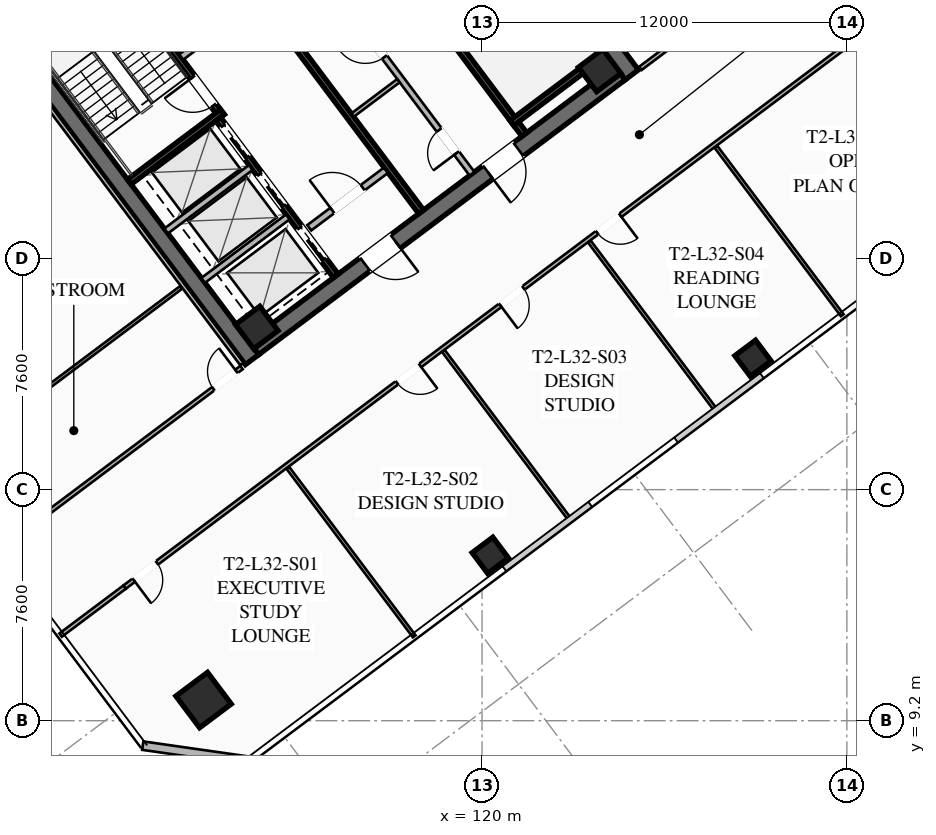
"""IFC4 building model, lengths in metres.
Left out: names, types, materials, properties, quantities, classifications, styles, units other than length and angle.
Written with IfcOpenShell. Run it as: python <this file> out.ifc"""

import sys

from ifc_helpers import new_model, si_unit, direction, frame, frame_2d, origin, origin_2d, place, context, subcontext, project, spatial, rectangle, hollow_rectangle, extrude, element, fill, save


model = new_model("IFC4")
c1 = context("Model", 3, precision=1e-05, world=origin(), true_north=direction((0.0, 1.0)))
c2 = subcontext(c1, "Body", "Model", "MODEL_VIEW")
j1 = project(units=[si_unit("LENGTHUNIT", "METRE"), si_unit("PLANEANGLEUNIT", "RADIAN")], contexts=[c1])
p1 = place(None, origin())
s1 = spatial("IfcSite", under=j1, at=p1, CompositionType="ELEMENT")
p2 = place(p1, origin())
s2 = spatial("IfcBuilding", under=s1, at=p2, CompositionType="ELEMENT")
p3 = place(p2, frame((0.0, 0.0, 121.5)))
s3 = spatial("IfcBuildingStorey", under=s2, at=p3, CompositionType="ELEMENT", Elevation=121.5)
for number, where, z_axis, x_axis in (
    (1, (112.436, 21.077, 0.0), (0.0, 0.0, 1.0), (-0.6, 0.8, 0.0)),
    (2, (115.564, 42.923, 0.0), (0.0, 0.0, 1.0), (0.6, -0.8, 0.0)),
):
    element("IfcWall", number, at=place(p3, frame(where, z_axis=z_axis, x_axis=x_axis)), inside=s3, PredefinedType="SHEAR", context=c2, shape_type="SweptSolid", body=[
        extrude(rectangle(XDim=15.6, YDim=0.55, at=frame_2d((7.8, 0.0))), origin(), (0.0, 0.0, 1.0), 3.55),
    ])
p4 = place(p3, frame((124.539, 30.498, 0.0), z_axis=(0.0, 0.0, 1.0), x_axis=(-0.799998054672, -0.600002593761, 0.0)))
e3 = element("IfcWall", 3, at=p4, inside=s3, PredefinedType="SHEAR", context=c2, shape_type="SweptSolid", body=[
    extrude(rectangle(XDim=15.06, YDim=0.55, at=frame_2d((7.53, 0.0))), origin(), (0.0, 0.0, 1.0), 3.55),
])
p5 = place(p4, frame((9.23, 0.0, 0.0)))
e4 = element("IfcOpeningElement", 4, at=p5, cuts=e3, PredefinedType="OPENING", context=c2, shape_type="SweptSolid", body=[
    extrude(rectangle(XDim=1.25, YDim=2.25, at=frame_2d((0.625, 1.125))), frame((0.0, 0.285, 0.0), z_axis=(0.0, -1.0, 0.0), x_axis=(1.0, 0.0, 0.0)), (0.0, 0.0, 1.0), 0.57),
])
p6 = place(p4, frame((4.18, 0.0, 0.0)))
e5 = element("IfcOpeningElement", 5, at=p6, cuts=e3, PredefinedType="OPENING", context=c2, shape_type="SweptSolid", body=[
    extrude(rectangle(XDim=1.25, YDim=2.25, at=frame_2d((0.625, 1.125))), frame((0.0, 0.285, 0.0), z_axis=(0.0, -1.0, 0.0), x_axis=(1.0, 0.0, 0.0)), (0.0, 0.0, 1.0), 0.57),
])
for number, where, z_axis, x_axis in (
    (6, (112.59, 22.13, 0.0), (0.0, 0.0, 1.0), (0.8, 0.6, 0.0)),
    (7, (123.87, 30.59, 0.0), (0.0, 0.0, 1.0), (0.8, 0.6, 0.0)),
):
    element("IfcColumn", number, at=place(p3, frame(where, z_axis=z_axis, x_axis=x_axis)), inside=s3, PredefinedType="COLUMN", context=c2, shape_type="SweptSolid", body=[
        extrude(hollow_rectangle(XDim=1.0, YDim=1.0, WallThickness=0.04, at=origin_2d()), origin(), (0.0, 0.0, 1.0), 3.37),
    ])
p7 = place(p3, frame((110.84, 9.88, 0.0), z_axis=(0.0, 0.0, 1.0), x_axis=(0.799999996291, 0.600000004945, 0.0)))
e8 = element("IfcColumn", 8, at=p7, inside=s3, PredefinedType="COLUMN", context=c2, shape_type="SweptSolid", body=[
    extrude(hollow_rectangle(XDim=1.3, YDim=1.3, WallThickness=0.05, at=origin_2d()), origin(), (0.0, 0.0, 1.0), 3.37),
])
for number, where, z_axis, x_axis in (
    (9, (120.27, 14.64, 0.0), (0.0, 0.0, 1.0), (0.8, 0.6, 0.0)),
    (10, (128.91, 21.12, 0.0), (0.0, 0.0, 1.0), (0.8, 0.6, 0.0)),
):
    element("IfcColumn", number, at=place(p3, frame(where, z_axis=z_axis, x_axis=x_axis)), inside=s3, PredefinedType="COLUMN", context=c2, shape_type="SweptSolid", body=[
        extrude(hollow_rectangle(XDim=0.85, YDim=0.85, WallThickness=0.035, at=origin_2d()), origin(), (0.0, 0.0, 1.0), 3.37),
    ])
p8 = place(p3, frame((112.34, 7.88, 0.0), z_axis=(0.0, 0.0, 1.0), x_axis=(-0.989949493661, 0.141421356237, 0.0)))
e11 = element("IfcWall", 11, at=p8, inside=s3, PredefinedType="SOLIDWALL", context=c2, shape_type="SweptSolid", body=[
    extrude(rectangle(XDim=3.536, YDim=0.28, at=frame_2d((1.768, 0.0))), origin(), (0.0, 0.0, 1.0), 3.37),
])
p9 = place(p3, frame((111.44, 29.08, 0.0), z_axis=(0.0, 0.0, 1.0), x_axis=(-0.59999029481, 0.8000072788, 0.0)))
e12 = element("IfcWall", 12, at=p9, inside=s3, PredefinedType="SHEAR", context=c2, shape_type="SweptSolid", body=[
    extrude(rectangle(XDim=8.05, YDim=0.2, at=frame_2d((4.025, 0.0))), origin(), (0.0, 0.0, 1.0), 3.37),
])
p10 = place(p9, frame((0.45, 0.0, 0.0)))
e13 = element("IfcOpeningElement", 13, at=p10, cuts=e12, PredefinedType="OPENING", context=c2, shape_type="SweptSolid", body=[
    extrude(rectangle(XDim=1.15, YDim=2.2, at=frame_2d((0.575, 1.1))), frame((0.0, 0.11, 0.0), z_axis=(0.0, -1.0, 0.0), x_axis=(1.0, 0.0, 0.0)), (0.0, 0.0, 1.0), 0.22),
])
p11 = place(p3, frame((108.396, 26.922, 0.0), z_axis=(0.0, 0.0, 1.0), x_axis=(0.800015298837, 0.599979601008, 0.0)))
e14 = element("IfcWall", 14, at=p11, inside=s3, PredefinedType="SHEAR", context=c2, shape_type="SweptSolid", body=[
    extrude(rectangle(XDim=3.83, YDim=0.2, at=frame_2d((1.915, 0.0))), origin(), (0.0, 0.0, 1.0), 3.37),
])
p12 = place(p3, frame((116.56, 34.92, 0.0), z_axis=(0.0, 0.0, 1.0), x_axis=(0.59999029481, -0.8000072788, 0.0)))
e15 = element("IfcWall", 15, at=p12, inside=s3, PredefinedType="SHEAR", context=c2, shape_type="SweptSolid", body=[
    extrude(rectangle(XDim=8.05, YDim=0.2, at=frame_2d((4.025, 0.0))), origin(), (0.0, 0.0, 1.0), 3.37),
])
p13 = place(p12, frame((0.45, 0.0, 0.0)))
e16 = element("IfcOpeningElement", 16, at=p13, cuts=e15, PredefinedType="OPENING", context=c2, shape_type="SweptSolid", body=[
    extrude(rectangle(XDim=1.15, YDim=2.2, at=frame_2d((0.575, 1.1))), frame((0.0, 0.11, 0.0), z_axis=(0.0, -1.0, 0.0), x_axis=(1.0, 0.0, 0.0)), (0.0, 0.0, 1.0), 0.22),
])
p14 = place(p3, frame((120.98, 28.86, 0.0), z_axis=(0.0, 0.0, 1.0), x_axis=(0.800015298837, 0.599979601008, 0.0)))
e17 = element("IfcWall", 17, at=p14, inside=s3, PredefinedType="SHEAR", context=c2, shape_type="SweptSolid", body=[
    extrude(rectangle(XDim=3.83, YDim=0.2, at=frame_2d((1.915, 0.0))), origin(), (0.0, 0.0, 1.0), 3.37),
])
p15 = place(p3, frame((117.998, 25.936, 0.0), z_axis=(0.0, 0.0, 1.0), x_axis=(-0.600002693989, 0.799997979501, 0.0)))
e18 = element("IfcWall", 18, at=p15, inside=s3, PredefinedType="SHEAR", context=c2, shape_type="SweptSolid", body=[
    extrude(rectangle(XDim=14.5, YDim=0.2, at=frame_2d((7.25, 0.0))), origin(), (0.0, 0.0, 1.0), 3.37),
])
p16 = place(p3, frame((110.104, 31.028, 0.0), z_axis=(0.0, 0.0, 1.0), x_axis=(0.800018601094, 0.59997519774, 0.0)))
e19 = element("IfcWall", 19, at=p16, inside=s3, PredefinedType="SOLIDWALL", context=c2, shape_type="SweptSolid", body=[
    extrude(rectangle(XDim=3.15, YDim=0.22, at=frame_2d((1.575, 0.0))), origin(), (0.0, 0.0, 1.0), 2.723),
])
p17 = place(p3, frame((114.316, 25.412, 0.0), z_axis=(0.0, 0.0, 1.0), x_axis=(0.800018601094, 0.59997519774, 0.0)))
e20 = element("IfcWall", 20, at=p17, inside=s3, PredefinedType="SOLIDWALL", context=c2, shape_type="SweptSolid", body=[
    extrude(rectangle(XDim=3.15, YDim=0.22, at=frame_2d((1.575, 0.0))), origin(), (0.0, 0.0, 1.0), 2.723),
])
p18 = place(p17, frame((0.95, 0.0, 0.0)))
e21 = element("IfcOpeningElement", 21, at=p18, cuts=e20, PredefinedType="OPENING", context=c2, shape_type="SweptSolid", body=[
    extrude(rectangle(XDim=1.25, YDim=2.25, at=frame_2d((0.625, 1.125))), frame((0.0, 0.12, 0.0), z_axis=(0.0, -1.0, 0.0), x_axis=(1.0, 0.0, 0.0)), (0.0, 0.0, 1.0), 0.24),
])
p19 = place(p3, frame((115.19, 23.83, 0.0), z_axis=(0.0, 0.0, 1.0), x_axis=(-0.599993943644, 0.800004542231, 0.0)))
e22 = element("IfcWall", 22, at=p19, inside=s3, PredefinedType="SHEAR", context=c2, shape_type="SweptSolid", body=[
    extrude(rectangle(XDim=6.45, YDim=0.2, at=frame_2d((3.225, 0.0))), origin(), (0.0, 0.0, 1.0), 3.37),
])
p20 = place(p19, frame((4.875, 0.0, 0.0)))
e23 = element("IfcOpeningElement", 23, at=p20, cuts=e22, PredefinedType="OPENING", context=c2, shape_type="SweptSolid", body=[
    extrude(rectangle(XDim=1.3, YDim=2.25, at=frame_2d((0.65, 1.125))), frame((0.0, 0.11, 0.0), z_axis=(0.0, -1.0, 0.0), x_axis=(1.0, 0.0, 0.0)), (0.0, 0.0, 1.0), 0.22),
])
p21 = place(p19, frame((2.875, 0.0, 0.0)))
e24 = element("IfcOpeningElement", 24, at=p21, cuts=e22, PredefinedType="OPENING", context=c2, shape_type="SweptSolid", body=[
    extrude(rectangle(XDim=1.3, YDim=2.25, at=frame_2d((0.65, 1.125))), frame((0.0, 0.11, 0.0), z_axis=(0.0, -1.0, 0.0), x_axis=(1.0, 0.0, 0.0)), (0.0, 0.0, 1.0), 0.22),
])
p22 = place(p19, frame((0.675, 0.0, 0.0)))
e25 = element("IfcOpeningElement", 25, at=p22, cuts=e22, PredefinedType="OPENING", context=c2, shape_type="SweptSolid", body=[
    extrude(rectangle(XDim=1.3, YDim=2.25, at=frame_2d((0.65, 1.125))), frame((0.0, 0.11, 0.0), z_axis=(0.0, -1.0, 0.0), x_axis=(1.0, 0.0, 0.0)), (0.0, 0.0, 1.0), 0.22),
])
for number, where, z_axis, x_axis in (
    (26, (110.826, 23.682, 0.0), (0.0, 0.0, 1.0), (0.8, 0.6, 0.0)),
    (27, (109.608, 25.306, 0.0), (0.0, 0.0, 1.0), (0.8, 0.6, 0.0)),
):
    element("IfcWall", number, at=place(p3, frame(where, z_axis=z_axis, x_axis=x_axis)), inside=s3, PredefinedType="SOLIDWALL", context=c2, shape_type="SweptSolid", body=[
        extrude(rectangle(XDim=3.48, YDim=0.2, at=frame_2d((1.74, 0.0))), origin(), (0.0, 0.0, 1.0), 3.37),
    ])
p23 = place(p3, frame((119.67, 27.19, 0.0), z_axis=(0.0, 0.0, 1.0), x_axis=(-0.599988677396, 0.800008491828, 0.0)))
e28 = element("IfcWall", 28, at=p23, inside=s3, PredefinedType="SOLIDWALL", context=c2, shape_type="SweptSolid", body=[
    extrude(rectangle(XDim=6.9, YDim=0.2, at=frame_2d((3.45, 0.0))), origin(), (0.0, 0.0, 1.0), 2.723),
])
p24 = place(p23, frame((0.85, 0.0, 0.0)))
e29 = element("IfcOpeningElement", 29, at=p24, cuts=e28, PredefinedType="OPENING", context=c2, shape_type="SweptSolid", body=[
    extrude(rectangle(XDim=0.95, YDim=2.05, at=frame_2d((0.475, 1.025))), frame((0.0, 0.11, 0.0), z_axis=(0.0, -1.0, 0.0), x_axis=(1.0, 0.0, 0.0)), (0.0, 0.0, 1.0), 0.22),
])
p25 = place(p23, frame((4.8, 0.0, 0.0)))
e30 = element("IfcOpeningElement", 30, at=p25, cuts=e28, PredefinedType="OPENING", context=c2, shape_type="SweptSolid", body=[
    extrude(rectangle(XDim=1.05, YDim=2.2, at=frame_2d((0.525, 1.1))), frame((0.0, 0.11, 0.0), z_axis=(0.0, -1.0, 0.0), x_axis=(1.0, 0.0, 0.0)), (0.0, 0.0, 1.0), 0.22),
])
p26 = place(p3, frame((115.746, 29.122, 0.0), z_axis=(0.0, 0.0, 1.0), x_axis=(0.8, 0.6, 0.0)))
e31 = element("IfcWall", 31, at=p26, inside=s3, PredefinedType="PARTITIONING", context=c2, shape_type="SweptSolid", body=[
    extrude(rectangle(XDim=1.88, YDim=0.135, at=frame_2d((0.94, 0.0))), origin(), (0.0, 0.0, 1.0), 2.723),
])
p27 = place(p3, frame((95.87, 30.09, 0.0), z_axis=(0.0, 0.0, 1.0), x_axis=(0.799997191971, 0.600003744021, 0.0)))
e32 = element("IfcWall", 32, at=p27, inside=s3, PredefinedType="PARTITIONING", context=c2, shape_type="SweptSolid", body=[
    extrude(rectangle(XDim=31.3, YDim=0.135, at=frame_2d((15.65, 0.0))), origin(), (0.0, 0.0, 1.0), 2.723),
])
p28 = place(p27, frame((0.3, 0.0, 0.0)))
e33 = element("IfcOpeningElement", 33, at=p28, cuts=e32, PredefinedType="OPENING", context=c2, shape_type="SweptSolid", body=[
    extrude(rectangle(XDim=0.95, YDim=2.05, at=frame_2d((0.475, 1.025))), frame((0.0, 0.077, 0.0), z_axis=(0.0, -1.0, 0.0), x_axis=(1.0, 0.0, 0.0)), (0.0, 0.0, 1.0), 0.155),
])
p29 = place(p27, frame((30.05, 0.0, 0.0)))
e34 = element("IfcOpeningElement", 34, at=p29, cuts=e32, PredefinedType="OPENING", context=c2, shape_type="SweptSolid", body=[
    extrude(rectangle(XDim=0.95, YDim=2.05, at=frame_2d((0.475, 1.025))), frame((0.0, 0.077, 0.0), z_axis=(0.0, -1.0, 0.0), x_axis=(1.0, 0.0, 0.0)), (0.0, 0.0, 1.0), 0.155),
])
p30 = place(p3, frame((133.282, 32.374, 0.0), z_axis=(0.0, 0.0, 1.0), x_axis=(-0.8, -0.6, 0.0)))
e35 = element("IfcWall", 35, at=p30, inside=s3, PredefinedType="PARTITIONING", context=c2, shape_type="SweptSolid", body=[
    extrude(rectangle(XDim=31.3, YDim=0.135, at=frame_2d((15.65, 0.0))), origin(), (0.0, 0.0, 1.0), 2.723),
])
p31 = place(p30, frame((29.97, 0.0, 0.0)))
e36 = element("IfcOpeningElement", 36, at=p31, cuts=e35, PredefinedType="OPENING", context=c2, shape_type="SweptSolid", body=[
    extrude(rectangle(XDim=0.95, YDim=2.05, at=frame_2d((0.475, 1.025))), frame((0.0, 0.077, 0.0), z_axis=(0.0, -1.0, 0.0), x_axis=(1.0, 0.0, 0.0)), (0.0, 0.0, 1.0), 0.155),
])
p32 = place(p30, frame((19.151, 0.0, 0.0)))
e37 = element("IfcOpeningElement", 37, at=p32, cuts=e35, PredefinedType="OPENING", context=c2, shape_type="SweptSolid", body=[
    extrude(rectangle(XDim=0.95, YDim=2.05, at=frame_2d((0.475, 1.025))), frame((0.0, 0.077, 0.0), z_axis=(0.0, -1.0, 0.0), x_axis=(1.0, 0.0, 0.0)), (0.0, 0.0, 1.0), 0.155),
])
p33 = place(p30, frame((14.901, 0.0, 0.0)))
e38 = element("IfcOpeningElement", 38, at=p33, cuts=e35, PredefinedType="OPENING", context=c2, shape_type="SweptSolid", body=[
    extrude(rectangle(XDim=0.95, YDim=2.05, at=frame_2d((0.475, 1.025))), frame((0.0, 0.077, 0.0), z_axis=(0.0, -1.0, 0.0), x_axis=(1.0, 0.0, 0.0)), (0.0, 0.0, 1.0), 0.155),
])
p34 = place(p30, frame((10.92, 0.0, 0.0)))
e39 = element("IfcOpeningElement", 39, at=p34, cuts=e35, PredefinedType="OPENING", context=c2, shape_type="SweptSolid", body=[
    extrude(rectangle(XDim=0.95, YDim=2.05, at=frame_2d((0.475, 1.025))), frame((0.0, 0.077, 0.0), z_axis=(0.0, -1.0, 0.0), x_axis=(1.0, 0.0, 0.0)), (0.0, 0.0, 1.0), 0.155),
])
p35 = place(p30, frame((0.38, 0.0, 0.0)))
e40 = element("IfcOpeningElement", 40, at=p35, cuts=e35, PredefinedType="OPENING", context=c2, shape_type="SweptSolid", body=[
    extrude(rectangle(XDim=0.95, YDim=2.05, at=frame_2d((0.475, 1.025))), frame((0.0, 0.077, 0.0), z_axis=(0.0, -1.0, 0.0), x_axis=(1.0, 0.0, 0.0)), (0.0, 0.0, 1.0), 0.155),
])
p36 = place(p3, frame((106.138, 12.016, 0.0), z_axis=(0.0, 0.0, 1.0), x_axis=(0.80002227902, 0.599970293491, 0.0)))
e41 = element("IfcWall", 41, at=p36, inside=s3, PredefinedType="PARTITIONING", context=c2, shape_type="SweptSolid", body=[
    extrude(rectangle(XDim=2.63, YDim=0.135, at=frame_2d((1.315, 0.0))), origin(), (0.0, 0.0, 1.0), 2.723),
])
p37 = place(p3, frame((117.768, 11.976, 0.0), z_axis=(0.0, 0.0, 1.0), x_axis=(-0.6, 0.8, 0.0)))
e42 = element("IfcWall", 42, at=p37, inside=s3, PredefinedType="PARTITIONING", context=c2, shape_type="SweptSolid", body=[
    extrude(rectangle(XDim=6.93, YDim=0.11, at=frame_2d((3.465, 0.0))), origin(), (0.0, 0.0, 1.0), 2.723),
])
p38 = place(p3, frame((122.888, 15.816, 0.0), z_axis=(0.0, 0.0, 1.0), x_axis=(-0.599983090003, 0.800012682219, 0.0)))
e43 = element("IfcWall", 43, at=p38, inside=s3, PredefinedType="PARTITIONING", context=c2, shape_type="SweptSolid", body=[
    extrude(rectangle(XDim=6.93, YDim=0.11, at=frame_2d((3.465, 0.0))), origin(), (0.0, 0.0, 1.0), 2.723),
])
p39 = place(p3, frame((127.688, 19.416, 0.0), z_axis=(0.0, 0.0, 1.0), x_axis=(-0.6, 0.8, 0.0)))
e44 = element("IfcWall", 44, at=p39, inside=s3, PredefinedType="PARTITIONING", context=c2, shape_type="SweptSolid", body=[
    extrude(rectangle(XDim=6.93, YDim=0.11, at=frame_2d((3.465, 0.0))), origin(), (0.0, 0.0, 1.0), 2.723),
])
p40 = place(p3, frame((131.848, 22.536, 0.0), z_axis=(0.0, 0.0, 1.0), x_axis=(-0.599983090003, 0.800012682219, 0.0)))
e45 = element("IfcWall", 45, at=p40, inside=s3, PredefinedType="PARTITIONING", context=c2, shape_type="SweptSolid", body=[
    extrude(rectangle(XDim=6.93, YDim=0.11, at=frame_2d((3.465, 0.0))), origin(), (0.0, 0.0, 1.0), 2.723),
])
p41 = place(p3, frame((125.208, 30.656, 0.0), z_axis=(0.0, 0.0, 1.0), x_axis=(0.799997105034, 0.600003859935, 0.0)))
e46 = element("IfcWall", 46, at=p41, inside=s3, PredefinedType="PARTITIONING", context=c2, shape_type="SweptSolid", body=[
    extrude(rectangle(XDim=10.12, YDim=0.135, at=frame_2d((5.06, 0.0))), origin(), (0.0, 0.0, 1.0), 2.723),
])
p42 = place(p41, frame((2.045, 0.0, 0.0)))
e47 = element("IfcOpeningElement", 47, at=p42, cuts=e46, PredefinedType="OPENING", context=c2, shape_type="SweptSolid", body=[
    extrude(rectangle(XDim=0.95, YDim=2.05, at=frame_2d((0.475, 1.025))), frame((0.0, 0.077, 0.0), z_axis=(0.0, -1.0, 0.0), x_axis=(1.0, 0.0, 0.0)), (0.0, 0.0, 1.0), 0.155),
])
p43 = place(p3, frame((112.104, 20.928, 0.0), z_axis=(0.0, 0.0, 1.0), x_axis=(-0.599994940075, 0.800003794918, 0.0)))
e48 = element("IfcWall", 48, at=p43, inside=s3, PredefinedType="PARTITIONING", context=c2, shape_type="SweptSolid", body=[
    extrude(rectangle(XDim=15.44, YDim=0.135, at=frame_2d((7.72, 0.0))), origin(), (0.0, 0.0, 1.0), 2.723),
])
p44 = place(p3, frame((104.056, 14.792, 0.0), z_axis=(0.0, 0.0, 1.0), x_axis=(0.800002918023, 0.599996109283, 0.0)))
e49 = element("IfcWall", 49, at=p44, inside=s3, PredefinedType="PARTITIONING", context=c2, shape_type="SweptSolid", body=[
    extrude(rectangle(XDim=10.04, YDim=0.135, at=frame_2d((5.02, 0.0))), origin(), (0.0, 0.0, 1.0), 2.723),
])
p45 = place(p44, frame((8.88, 0.0, 0.0)))
e50 = element("IfcOpeningElement", 50, at=p45, cuts=e49, PredefinedType="OPENING", context=c2, shape_type="SweptSolid", body=[
    extrude(rectangle(XDim=0.95, YDim=2.05, at=frame_2d((0.475, 1.025))), frame((0.0, 0.077, 0.0), z_axis=(0.0, -1.0, 0.0), x_axis=(1.0, 0.0, 0.0)), (0.0, 0.0, 1.0), 0.155),
])
p46 = place(p3, frame((102.076, 17.432, 0.0), z_axis=(0.0, 0.0, 1.0), x_axis=(0.799991245945, 0.600011671896, 0.0)))
e51 = element("IfcWall", 51, at=p46, inside=s3, PredefinedType="PARTITIONING", context=c2, shape_type="SweptSolid", body=[
    extrude(rectangle(XDim=10.04, YDim=0.11, at=frame_2d((5.02, 0.0))), origin(), (0.0, 0.0, 1.0), 2.723),
])
p47 = place(p5, origin())
e52 = element("IfcDoor", 52, at=p47, inside=s3, OperationType="SINGLE_SWING_LEFT", PredefinedType="DOOR", context=c2, shape_type="SweptSolid", body=[
    extrude(rectangle(XDim=1.25, YDim=2.25, at=frame_2d((0.625, 1.125))), frame((0.0, 0.025, 0.0), z_axis=(0.0, -1.0, 0.0), x_axis=(1.0, 0.0, 0.0)), (0.0, 0.0, 1.0), 0.05),
])
fill(e4, e52)
p48 = place(p6, origin())
e53 = element("IfcDoor", 53, at=p48, inside=s3, OperationType="SINGLE_SWING_RIGHT", PredefinedType="DOOR", context=c2, shape_type="SweptSolid", body=[
    extrude(rectangle(XDim=1.25, YDim=2.25, at=frame_2d((0.625, 1.125))), frame((0.0, 0.025, 0.0), z_axis=(0.0, -1.0, 0.0), x_axis=(1.0, 0.0, 0.0)), (0.0, 0.0, 1.0), 0.05),
])
fill(e5, e53)
p49 = place(p10, origin())
e54 = element("IfcDoor", 54, at=p49, inside=s3, OperationType="SINGLE_SWING_RIGHT", PredefinedType="DOOR", context=c2, shape_type="SweptSolid", body=[
    extrude(rectangle(XDim=1.15, YDim=2.2, at=frame_2d((0.575, 1.1))), frame((0.0, 0.025, 0.0), z_axis=(0.0, -1.0, 0.0), x_axis=(1.0, 0.0, 0.0)), (0.0, 0.0, 1.0), 0.05),
])
fill(e13, e54)
p50 = place(p18, origin())
e55 = element("IfcDoor", 55, at=p50, inside=s3, OperationType="SINGLE_SWING_LEFT", PredefinedType="DOOR", context=c2, shape_type="SweptSolid", body=[
    extrude(rectangle(XDim=1.25, YDim=2.25, at=frame_2d((0.625, 1.125))), frame((0.0, 0.025, 0.0), z_axis=(0.0, -1.0, 0.0), x_axis=(1.0, 0.0, 0.0)), (0.0, 0.0, 1.0), 0.05),
])
fill(e21, e55)
p51 = place(p24, origin())
e56 = element("IfcDoor", 56, at=p51, inside=s3, OperationType="SINGLE_SWING_LEFT", PredefinedType="DOOR", context=c2, shape_type="SweptSolid", body=[
    extrude(rectangle(XDim=0.95, YDim=2.05, at=frame_2d((0.475, 1.025))), frame((0.0, 0.025, 0.0), z_axis=(0.0, -1.0, 0.0), x_axis=(1.0, 0.0, 0.0)), (0.0, 0.0, 1.0), 0.05),
])
fill(e29, e56)
p52 = place(p25, origin())
e57 = element("IfcDoor", 57, at=p52, inside=s3, OperationType="SINGLE_SWING_RIGHT", PredefinedType="DOOR", context=c2, shape_type="SweptSolid", body=[
    extrude(rectangle(XDim=1.05, YDim=2.2, at=frame_2d((0.525, 1.1))), frame((0.0, 0.025, 0.0), z_axis=(0.0, -1.0, 0.0), x_axis=(1.0, 0.0, 0.0)), (0.0, 0.0, 1.0), 0.05),
])
fill(e30, e57)
p53 = place(p31, origin())
e58 = element("IfcDoor", 58, at=p53, inside=s3, OperationType="SINGLE_SWING_RIGHT", PredefinedType="DOOR", context=c2, shape_type="SweptSolid", body=[
    extrude(rectangle(XDim=0.95, YDim=2.05, at=frame_2d((0.475, 1.025))), frame((0.0, 0.025, 0.0), z_axis=(0.0, -1.0, 0.0), x_axis=(1.0, 0.0, 0.0)), (0.0, 0.0, 1.0), 0.05),
])
fill(e36, e58)
p54 = place(p32, origin())
e59 = element("IfcDoor", 59, at=p54, inside=s3, OperationType="SINGLE_SWING_LEFT", PredefinedType="DOOR", context=c2, shape_type="SweptSolid", body=[
    extrude(rectangle(XDim=0.95, YDim=2.05, at=frame_2d((0.475, 1.025))), frame((0.0, 0.025, 0.0), z_axis=(0.0, -1.0, 0.0), x_axis=(1.0, 0.0, 0.0)), (0.0, 0.0, 1.0), 0.05),
])
fill(e37, e59)
p55 = place(p33, origin())
e60 = element("IfcDoor", 60, at=p55, inside=s3, OperationType="SINGLE_SWING_RIGHT", PredefinedType="DOOR", context=c2, shape_type="SweptSolid", body=[
    extrude(rectangle(XDim=0.95, YDim=2.05, at=frame_2d((0.475, 1.025))), frame((0.0, 0.025, 0.0), z_axis=(0.0, -1.0, 0.0), x_axis=(1.0, 0.0, 0.0)), (0.0, 0.0, 1.0), 0.05),
])
fill(e38, e60)
p56 = place(p34, origin())
e61 = element("IfcDoor", 61, at=p56, inside=s3, OperationType="SINGLE_SWING_LEFT", PredefinedType="DOOR", context=c2, shape_type="SweptSolid", body=[
    extrude(rectangle(XDim=0.95, YDim=2.05, at=frame_2d((0.475, 1.025))), frame((0.0, 0.025, 0.0), z_axis=(0.0, -1.0, 0.0), x_axis=(1.0, 0.0, 0.0)), (0.0, 0.0, 1.0), 0.05),
])
fill(e39, e61)
p57 = place(p45, origin())
e62 = element("IfcDoor", 62, at=p57, inside=s3, OperationType="SINGLE_SWING_RIGHT", PredefinedType="DOOR", context=c2, shape_type="SweptSolid", body=[
    extrude(rectangle(XDim=0.95, YDim=2.05, at=frame_2d((0.475, 1.025))), frame((0.0, 0.025, 0.0), z_axis=(0.0, -1.0, 0.0), x_axis=(1.0, 0.0, 0.0)), (0.0, 0.0, 1.0), 0.05),
])
fill(e50, e62)
p58 = place(p20, origin())
e63 = element("IfcDoor", 63, at=p58, inside=s3, OperationType="SLIDING_TO_LEFT", PredefinedType="DOOR", context=c2, shape_type="SweptSolid", body=[
    extrude(rectangle(XDim=1.3, YDim=2.25, at=frame_2d((0.65, 1.125))), frame((0.0, 0.025, 0.0), z_axis=(0.0, -1.0, 0.0), x_axis=(1.0, 0.0, 0.0)), (0.0, 0.0, 1.0), 0.05),
])
fill(e23, e63)
p59 = place(p21, origin())
e64 = element("IfcDoor", 64, at=p59, inside=s3, OperationType="SLIDING_TO_LEFT", PredefinedType="DOOR", context=c2, shape_type="SweptSolid", body=[
    extrude(rectangle(XDim=1.3, YDim=2.25, at=frame_2d((0.65, 1.125))), frame((0.0, 0.025, 0.0), z_axis=(0.0, -1.0, 0.0), x_axis=(1.0, 0.0, 0.0)), (0.0, 0.0, 1.0), 0.05),
])
fill(e24, e64)
p60 = place(p22, origin())
e65 = element("IfcDoor", 65, at=p60, inside=s3, OperationType="SLIDING_TO_LEFT", PredefinedType="DOOR", context=c2, shape_type="SweptSolid", body=[
    extrude(rectangle(XDim=1.3, YDim=2.25, at=frame_2d((0.65, 1.125))), frame((0.0, 0.025, 0.0), z_axis=(0.0, -1.0, 0.0), x_axis=(1.0, 0.0, 0.0)), (0.0, 0.0, 1.0), 0.05),
])
fill(e25, e65)
save(model, sys.argv[1])
